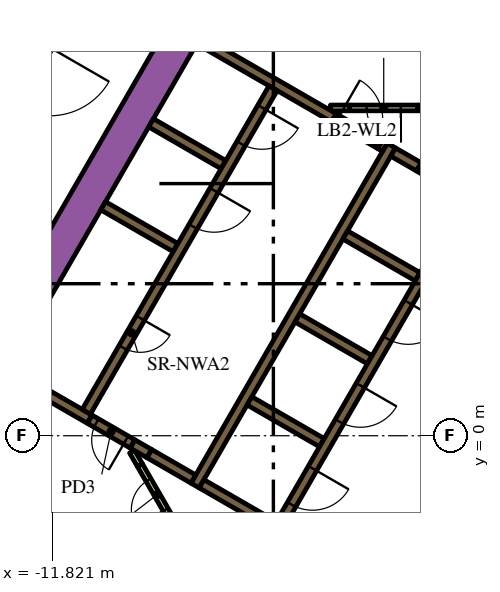
"""IFC4 building model, lengths in metres.
Left out: names, types, materials, properties, quantities, classifications, styles, units other than length and angle.
Written with IfcOpenShell. Run it as: python <this file> out.ifc"""

import sys

from ifc_helpers import new_model, si_unit, direction, frame, frame_2d, origin, place, context, subcontext, project, spatial, polyline, rectangle, outline, extrude, element, fill, save


model = new_model("IFC4")
c1 = context("Model", 3, precision=1e-05, world=origin(), true_north=direction((0.0, 1.0)))
c2 = subcontext(c1, "Body", "Model", "MODEL_VIEW")
j1 = project(units=[si_unit("LENGTHUNIT", "METRE"), si_unit("PLANEANGLEUNIT", "RADIAN")], contexts=[c1])
p1 = place(None, origin())
s1 = spatial("IfcSite", under=j1, at=p1, CompositionType="ELEMENT")
p2 = place(p1, origin())
s2 = spatial("IfcBuilding", under=s1, at=p2, CompositionType="ELEMENT")
p3 = place(p2, frame((0.0, 0.0, 134.4)))
s3 = spatial("IfcBuildingStorey", under=s2, at=p3, CompositionType="ELEMENT", Elevation=134.4)
p4 = place(p3, frame((-14.268, 0.387, 0.0), z_axis=(0.0, 0.0, 1.0), x_axis=(0.499994617707, 0.866028511231, 0.0)))
e1 = element("IfcWall", 1, at=p4, inside=s3, PredefinedType="SOLIDWALL", context=c2, shape_type="SweptSolid", body=[
    extrude(rectangle(XDim=18.817, YDim=0.9, at=frame_2d((9.409, 0.0))), origin(), (0.0, 0.0, 1.0), 7.2),
])
p5 = place(p3, frame((-8.06, -1.311, 0.0), z_axis=(0.0, 0.0, 1.0), x_axis=(0.50000273126, 0.866023826885, 0.0)))
e2 = element("IfcWall", 2, at=p5, inside=s3, PredefinedType="SOLIDWALL", context=c2, shape_type="SweptSolid", body=[
    extrude(rectangle(XDim=10.33, YDim=0.25, at=frame_2d((5.165, 0.0))), origin(), (0.0, 0.0, 1.0), 7.2),
])
p6 = place(p3, frame((-1.819, 6.87, 0.0), z_axis=(0.0, 0.0, 1.0), x_axis=(-0.866294599386, 0.499533449405, 0.0)))
e3 = element("IfcWall", 3, at=p6, inside=s3, PredefinedType="SOLIDWALL", context=c2, shape_type="SweptSolid", body=[
    extrude(rectangle(XDim=0.41, YDim=0.25, at=frame_2d((0.205, 0.0))), origin(), (0.0, 0.0, 1.0), 7.2),
])
p7 = place(p3, frame((-2.849, 7.465, 0.0), z_axis=(0.0, 0.0, 1.0), x_axis=(0.865955664968, -0.500120771724, 0.0)))
e4 = element("IfcWall", 4, at=p7, inside=s3, PredefinedType="SOLIDWALL", context=c2, shape_type="SweptSolid", body=[
    extrude(rectangle(XDim=0.778, YDim=0.25, at=frame_2d((0.389, 0.0))), origin(), (0.0, 0.0, 1.0), 7.2),
])
for number, where, z_axis, x_axis in (
    (5, (-2.204, 4.182, 0.0), (0.0, 0.0, 1.0), (-0.866, 0.5, 0.0)),
    (6, (-5.369, 3.1, 0.0), (0.0, 0.0, 1.0), (0.866, -0.5, 0.0)),
    (7, (-4.724, -0.182, 0.0), (0.0, 0.0, 1.0), (-0.866, 0.5, 0.0)),
):
    element("IfcWall", number, at=place(p3, frame(where, z_axis=z_axis, x_axis=x_axis)), inside=s3, PredefinedType="SOLIDWALL", context=c2, shape_type="SweptSolid", body=[
        extrude(rectangle(XDim=2.2, YDim=0.25, at=frame_2d((1.1, 0.0))), origin(), (0.0, 0.0, 1.0), 7.2),
    ])
p8 = place(p3, origin())
e8 = element("IfcWall", 8, at=p8, inside=s3, PredefinedType="SOLIDWALL", context=c2, shape_type="SweptSolid", body=[
    extrude(outline(polyline([(-5.922, -2.257), (-5.922, -2.257), (-5.705, -2.382), (-5.83, -2.598), (-6.418, -2.258), (-6.433, -2.153), (-6.433, -2.153), (-6.433, -2.153), (-6.508, -2.163), (-6.508, -2.163), (-6.508, -2.163), (-6.501, -2.21), (-7.952, -1.373), (-7.827, -1.156), (-5.922, -2.257)])), origin(), (0.0, 0.0, 1.0), 7.2),
])
p9 = place(p3, frame((-9.708, -0.215, 0.0), z_axis=(0.0, 0.0, 1.0), x_axis=(0.866113839764, -0.499846793097, 0.0)))
e9 = element("IfcWall", 9, at=p9, inside=s3, PredefinedType="SOLIDWALL", context=c2, shape_type="SweptSolid", body=[
    extrude(rectangle(XDim=0.51, YDim=0.25, at=frame_2d((0.255, 0.0))), origin(), (0.0, 0.0, 1.0), 7.2),
])
p10 = place(p3, frame((-12.999, 1.685, 0.0), z_axis=(0.0, 0.0, 1.0), x_axis=(0.865996765544, -0.500049599607, 0.0)))
e10 = element("IfcWall", 10, at=p10, inside=s3, PredefinedType="SOLIDWALL", context=c2, shape_type="SweptSolid", body=[
    extrude(rectangle(XDim=2.498, YDim=0.25, at=frame_2d((1.249, 0.0))), origin(), (0.0, 0.0, 1.0), 7.2),
])
p11 = place(p3, frame((-9.265, -0.471, 0.0), z_axis=(0.0, 0.0, 1.0), x_axis=(0.865954634268, -0.500122556369, 0.0)))
e11 = element("IfcWall", 11, at=p11, inside=s3, PredefinedType="SOLIDWALL", context=c2, shape_type="SweptSolid", body=[
    extrude(rectangle(XDim=1.338, YDim=0.25, at=frame_2d((0.669, 0.0))), origin(), (0.0, 0.0, 1.0), 7.2),
])
e12 = element("IfcWall", 12, at=p8, inside=s3, PredefinedType="SOLIDWALL", context=c2, shape_type="SweptSolid", body=[
    extrude(outline(polyline([(-3.128, 7.481), (-3.259, 7.557), (-3.134, 7.773), (-3.003, 7.698), (-3.128, 7.481)])), origin(), (0.0, 0.0, 1.0), 7.2),
])
for number, where, z_axis, x_axis in (
    (13, (-8.574, 4.95, 0.0), (0.0, 0.0, 1.0), (-0.866, 0.5, 0.0)),
    (14, (-7.314, 7.132, 0.0), (0.0, 0.0, 1.0), (-0.866, 0.5, 0.0)),
):
    element("IfcWall", number, at=place(p3, frame(where, z_axis=z_axis, x_axis=x_axis)), inside=s3, PredefinedType="SOLIDWALL", context=c2, shape_type="SweptSolid", body=[
        extrude(rectangle(XDim=2.2, YDim=0.25, at=frame_2d((1.1, 0.0))), origin(), (0.0, 0.0, 1.0), 7.2),
    ])
p12 = place(p3, frame((-7.959, 10.415, 0.0), z_axis=(0.0, 0.0, 1.0), x_axis=(0.866020958405, -0.500007699544, 0.0)))
e15 = element("IfcWall", 15, at=p12, inside=s3, PredefinedType="SOLIDWALL", context=c2, shape_type="SweptSolid", body=[
    extrude(rectangle(XDim=4.1, YDim=0.25, at=frame_2d((2.05, 0.0))), origin(), (0.0, 0.0, 1.0), 7.2),
])
p13 = place(p3, frame((-6.531, -2.689, 0.0), z_axis=(0.0, 0.0, 1.0), x_axis=(-0.499967446111, 0.866044197965, 0.0)))
e16 = element("IfcWall", 16, at=p13, inside=s3, PredefinedType="PARTITIONING", context=c2, shape_type="SweptSolid", body=[
    extrude(rectangle(XDim=0.748, YDim=0.15, at=frame_2d((0.374, 0.0))), origin(), (0.0, 0.0, 1.0), 6.15),
])
p14 = place(p3, frame((-9.512, -0.775, 0.0), z_axis=(0.0, 0.0, 1.0), x_axis=(-0.500080620599, 0.865978852456, 0.0)))
e17 = element("IfcWall", 17, at=p14, inside=s3, PredefinedType="PARTITIONING", context=c2, shape_type="SweptSolid", body=[
    extrude(rectangle(XDim=0.413, YDim=0.15, at=frame_2d((0.207, 0.0))), origin(), (0.0, 0.0, 1.0), 6.15),
])
p15 = place(p3, frame((-3.997, 8.625, 0.0), z_axis=(0.0, 0.0, 1.0), x_axis=(-1.0, 0.0, 0.0)))
e18 = element("IfcWall", 18, at=p15, inside=s3, PredefinedType="PARTITIONING", context=c2, shape_type="SweptSolid", body=[
    extrude(rectangle(XDim=0.502, YDim=0.15, at=frame_2d((0.251, 0.0))), origin(), (0.0, 0.0, 1.0), 6.15),
])
p16 = place(p3, frame((-2.196, 8.625, 0.0), z_axis=(0.0, 0.0, 1.0), x_axis=(1.0, 0.0, 0.0)))
e19 = element("IfcWall", 19, at=p16, inside=s3, PredefinedType="PARTITIONING", context=c2, shape_type="SweptSolid", body=[
    extrude(rectangle(XDim=1.146, YDim=0.15, at=frame_2d((0.573, 0.0))), origin(), (0.0, 0.0, 1.0), 6.15),
])
p17 = place(p3, frame((-6.008, 9.144, 0.0), z_axis=(0.0, 0.0, 1.0), x_axis=(-0.500006956611, -0.866021387346, 0.0)))
e20 = element("IfcWall", 20, at=p17, inside=s3, PredefinedType="SOLIDWALL", context=c2, shape_type="SweptSolid", body=[
    extrude(rectangle(XDim=9.83, YDim=0.25, at=frame_2d((4.915, 0.0))), origin(), (0.0, 0.0, 1.0), 7.2),
])
p18 = place(p17, frame((0.585, 0.0, 0.0)))
e21 = element("IfcOpeningElement", 21, at=p18, cuts=e20, PredefinedType="OPENING", context=c2, shape_type="SweptSolid", body=[
    extrude(rectangle(XDim=1.1, YDim=2.1, at=frame_2d((0.55, 1.05))), frame((0.0, 0.135, 0.0), z_axis=(0.0, -1.0, 0.0), x_axis=(1.0, 0.0, 0.0)), (0.0, 0.0, 1.0), 0.27),
])
p19 = place(p17, frame((3.105, 0.0, 0.0)))
e22 = element("IfcOpeningElement", 22, at=p19, cuts=e20, PredefinedType="OPENING", context=c2, shape_type="SweptSolid", body=[
    extrude(rectangle(XDim=1.1, YDim=2.1, at=frame_2d((0.55, 1.05))), frame((0.0, 0.135, 0.0), z_axis=(0.0, -1.0, 0.0), x_axis=(1.0, 0.0, 0.0)), (0.0, 0.0, 1.0), 0.27),
])
p20 = place(p17, frame((6.985, 0.0, 0.0)))
e23 = element("IfcOpeningElement", 23, at=p20, cuts=e20, PredefinedType="OPENING", context=c2, shape_type="SweptSolid", body=[
    extrude(rectangle(XDim=0.9, YDim=2.1, at=frame_2d((0.45, 1.05))), frame((0.0, 0.135, 0.0), z_axis=(0.0, -1.0, 0.0), x_axis=(1.0, 0.0, 0.0)), (0.0, 0.0, 1.0), 0.27),
])
p21 = place(p3, frame((-0.898, 6.194, 0.0), z_axis=(0.0, 0.0, 1.0), x_axis=(-0.499996202215, -0.866027596426, 0.0)))
e24 = element("IfcWall", 24, at=p21, inside=s3, PredefinedType="SOLIDWALL", context=c2, shape_type="SweptSolid", body=[
    extrude(rectangle(XDim=9.83, YDim=0.25, at=frame_2d((4.915, 0.0))), origin(), (0.0, 0.0, 1.0), 7.2),
])
p22 = place(p21, frame((0.585, 0.0, 0.0)))
e25 = element("IfcOpeningElement", 25, at=p22, cuts=e24, PredefinedType="OPENING", context=c2, shape_type="SweptSolid", body=[
    extrude(rectangle(XDim=1.1, YDim=2.1, at=frame_2d((0.55, 1.05))), frame((0.0, 0.135, 0.0), z_axis=(0.0, -1.0, 0.0), x_axis=(1.0, 0.0, 0.0)), (0.0, 0.0, 1.0), 0.27),
])
p23 = place(p21, frame((3.105, 0.0, 0.0)))
e26 = element("IfcOpeningElement", 26, at=p23, cuts=e24, PredefinedType="OPENING", context=c2, shape_type="SweptSolid", body=[
    extrude(rectangle(XDim=1.1, YDim=2.1, at=frame_2d((0.55, 1.05))), frame((0.0, 0.135, 0.0), z_axis=(0.0, -1.0, 0.0), x_axis=(1.0, 0.0, 0.0)), (0.0, 0.0, 1.0), 0.27),
])
p24 = place(p21, frame((5.625, 0.0, 0.0)))
e27 = element("IfcOpeningElement", 27, at=p24, cuts=e24, PredefinedType="OPENING", context=c2, shape_type="SweptSolid", body=[
    extrude(rectangle(XDim=1.1, YDim=2.1, at=frame_2d((0.55, 1.05))), frame((0.0, 0.135, 0.0), z_axis=(0.0, -1.0, 0.0), x_axis=(1.0, 0.0, 0.0)), (0.0, 0.0, 1.0), 0.27),
])
p25 = place(p21, frame((8.145, 0.0, 0.0)))
e28 = element("IfcOpeningElement", 28, at=p25, cuts=e24, PredefinedType="OPENING", context=c2, shape_type="SweptSolid", body=[
    extrude(rectangle(XDim=1.1, YDim=2.1, at=frame_2d((0.55, 1.05))), frame((0.0, 0.135, 0.0), z_axis=(0.0, -1.0, 0.0), x_axis=(1.0, 0.0, 0.0)), (0.0, 0.0, 1.0), 0.27),
])
p26 = place(p3, frame((-2.196, 8.625, 0.0), z_axis=(0.0, 0.0, 1.0), x_axis=(-1.0, 0.0, 0.0)))
e29 = element("IfcWall", 29, at=p26, inside=s3, PredefinedType="PARTITIONING", context=c2, shape_type="SweptSolid", body=[
    extrude(rectangle(XDim=1.8, YDim=0.15, at=frame_2d((0.9, 0.0))), origin(), (0.0, 0.0, 1.0), 6.15),
])
p27 = place(p26, frame((0.45, 0.0, 0.0)))
e30 = element("IfcOpeningElement", 30, at=p27, cuts=e29, PredefinedType="OPENING", context=c2, shape_type="SweptSolid", body=[
    extrude(rectangle(XDim=0.9, YDim=2.1, at=frame_2d((0.45, 1.05))), frame((0.0, 0.085, 0.0), z_axis=(0.0, -1.0, 0.0), x_axis=(1.0, 0.0, 0.0)), (0.0, 0.0, 1.0), 0.17),
])
p28 = place(p3, frame((-9.708, -0.215, 0.0), z_axis=(0.0, 0.0, 1.0), x_axis=(-0.866004217611, 0.500036693733, 0.0)))
e31 = element("IfcWall", 31, at=p28, inside=s3, PredefinedType="SOLIDWALL", context=c2, shape_type="SweptSolid", body=[
    extrude(rectangle(XDim=1.3, YDim=0.25, at=frame_2d((0.65, 0.0))), origin(), (0.0, 0.0, 1.0), 7.2),
])
p29 = place(p28, frame((0.2, 0.0, 0.0)))
e32 = element("IfcOpeningElement", 32, at=p29, cuts=e31, PredefinedType="OPENING", context=c2, shape_type="SweptSolid", body=[
    extrude(rectangle(XDim=0.9, YDim=2.1, at=frame_2d((0.45, 1.05))), frame((0.0, 0.135, 0.0), z_axis=(0.0, -1.0, 0.0), x_axis=(1.0, 0.0, 0.0)), (0.0, 0.0, 1.0), 0.27),
])
p30 = place(p3, frame((-4.409, 8.365, 0.0), z_axis=(0.0, 0.0, 1.0), x_axis=(0.866034573852, -0.49998411664, 0.0)))
e33 = element("IfcWall", 33, at=p30, inside=s3, PredefinedType="SOLIDWALL", context=c2, shape_type="SweptSolid", body=[
    extrude(rectangle(XDim=1.4, YDim=0.25, at=frame_2d((0.7, 0.0))), origin(), (0.0, 0.0, 1.0), 7.2),
])
p31 = place(p30, frame((0.1, 0.0, 0.0)))
e34 = element("IfcOpeningElement", 34, at=p31, cuts=e33, PredefinedType="OPENING", context=c2, shape_type="SweptSolid", body=[
    extrude(rectangle(XDim=1.2, YDim=2.1, at=frame_2d((0.6, 1.05))), frame((0.0, 0.135, 0.0), z_axis=(0.0, -1.0, 0.0), x_axis=(1.0, 0.0, 0.0)), (0.0, 0.0, 1.0), 0.27),
])
p32 = place(p3, frame((-8.612, -2.333, 0.0), z_axis=(0.0, 0.0, 1.0), x_axis=(-0.499961193289, 0.866047807691, 0.0)))
e35 = element("IfcWall", 35, at=p32, inside=s3, PredefinedType="PARTITIONING", context=c2, shape_type="SweptSolid", body=[
    extrude(rectangle(XDim=1.8, YDim=0.15, at=frame_2d((0.9, 0.0))), origin(), (0.0, 0.0, 1.0), 6.15),
])
p33 = place(p32, frame((0.45, 0.0, 0.0)))
e36 = element("IfcOpeningElement", 36, at=p33, cuts=e35, PredefinedType="OPENING", context=c2, shape_type="SweptSolid", body=[
    extrude(rectangle(XDim=0.9, YDim=2.1, at=frame_2d((0.45, 1.05))), frame((0.0, 0.085, 0.0), z_axis=(0.0, -1.0, 0.0), x_axis=(1.0, 0.0, 0.0)), (0.0, 0.0, 1.0), 0.17),
])
p34 = place(p3, frame((-6.639, 19.3, 0.0), z_axis=(0.0, 0.0, 1.0), x_axis=(-0.500001456469, -0.86602456289, 0.0)))
e37 = element("IfcWall", 37, at=p34, inside=s3, PredefinedType="PARTITIONING", context=c2, shape_type="SweptSolid", body=[
    extrude(rectangle(XDim=22.774, YDim=0.15, at=frame_2d((11.387, 0.0))), origin(), (0.0, 0.0, 1.0), 6.15),
])
p35 = place(p34, frame((10.487, 0.0, 0.0)))
e38 = element("IfcOpeningElement", 38, at=p35, cuts=e37, PredefinedType="OPENING", context=c2, shape_type="SweptSolid", body=[
    extrude(rectangle(XDim=1.8, YDim=2.1, at=frame_2d((0.9, 1.05))), frame((0.0, 0.085, 0.0), z_axis=(0.0, -1.0, 0.0), x_axis=(1.0, 0.0, 0.0)), (0.0, 0.0, 1.0), 0.17),
])
p36 = place(p34, frame((7.377, 0.0, 0.0)))
e39 = element("IfcOpeningElement", 39, at=p36, cuts=e37, PredefinedType="OPENING", context=c2, shape_type="SweptSolid", body=[
    extrude(rectangle(XDim=1.8, YDim=2.1, at=frame_2d((0.9, 1.05))), frame((0.0, 0.085, 0.0), z_axis=(0.0, -1.0, 0.0), x_axis=(1.0, 0.0, 0.0)), (0.0, 0.0, 1.0), 0.17),
])
p37 = place(p18, origin())
e40 = element("IfcDoor", 40, at=p37, inside=s3, OperationType="DOUBLE_DOOR_SLIDING", PredefinedType="DOOR", context=c2, shape_type="SweptSolid", body=[
    extrude(rectangle(XDim=1.1, YDim=2.1, at=frame_2d((0.55, 1.05))), frame((0.0, 0.025, 0.0), z_axis=(0.0, -1.0, 0.0), x_axis=(1.0, 0.0, 0.0)), (0.0, 0.0, 1.0), 0.05),
])
fill(e21, e40)
p38 = place(p19, origin())
e41 = element("IfcDoor", 41, at=p38, inside=s3, OperationType="DOUBLE_DOOR_SLIDING", PredefinedType="DOOR", context=c2, shape_type="SweptSolid", body=[
    extrude(rectangle(XDim=1.1, YDim=2.1, at=frame_2d((0.55, 1.05))), frame((0.0, 0.025, 0.0), z_axis=(0.0, -1.0, 0.0), x_axis=(1.0, 0.0, 0.0)), (0.0, 0.0, 1.0), 0.05),
])
fill(e22, e41)
p39 = place(p20, origin())
e42 = element("IfcDoor", 42, at=p39, inside=s3, OperationType="SINGLE_SWING_LEFT", PredefinedType="DOOR", context=c2, shape_type="SweptSolid", body=[
    extrude(rectangle(XDim=0.9, YDim=2.1, at=frame_2d((0.45, 1.05))), frame((0.0, 0.025, 0.0), z_axis=(0.0, -1.0, 0.0), x_axis=(1.0, 0.0, 0.0)), (0.0, 0.0, 1.0), 0.05),
])
fill(e23, e42)
p40 = place(p23, origin())
e43 = element("IfcDoor", 43, at=p40, inside=s3, OperationType="DOUBLE_DOOR_SLIDING", PredefinedType="DOOR", context=c2, shape_type="SweptSolid", body=[
    extrude(rectangle(XDim=1.1, YDim=2.1, at=frame_2d((0.55, 1.05))), frame((0.0, 0.025, 0.0), z_axis=(0.0, -1.0, 0.0), x_axis=(1.0, 0.0, 0.0)), (0.0, 0.0, 1.0), 0.05),
])
fill(e26, e43)
p41 = place(p24, origin())
e44 = element("IfcDoor", 44, at=p41, inside=s3, OperationType="DOUBLE_DOOR_SLIDING", PredefinedType="DOOR", context=c2, shape_type="SweptSolid", body=[
    extrude(rectangle(XDim=1.1, YDim=2.1, at=frame_2d((0.55, 1.05))), frame((0.0, 0.025, 0.0), z_axis=(0.0, -1.0, 0.0), x_axis=(1.0, 0.0, 0.0)), (0.0, 0.0, 1.0), 0.05),
])
fill(e27, e44)
p42 = place(p25, origin())
e45 = element("IfcDoor", 45, at=p42, inside=s3, OperationType="DOUBLE_DOOR_SLIDING", PredefinedType="DOOR", context=c2, shape_type="SweptSolid", body=[
    extrude(rectangle(XDim=1.1, YDim=2.1, at=frame_2d((0.55, 1.05))), frame((0.0, 0.025, 0.0), z_axis=(0.0, -1.0, 0.0), x_axis=(1.0, 0.0, 0.0)), (0.0, 0.0, 1.0), 0.05),
])
fill(e28, e45)
p43 = place(p27, origin())
e46 = element("IfcDoor", 46, at=p43, inside=s3, OperationType="SINGLE_SWING_LEFT", PredefinedType="DOOR", context=c2, shape_type="SweptSolid", body=[
    extrude(rectangle(XDim=0.9, YDim=2.1, at=frame_2d((0.45, 1.05))), frame((0.0, 0.025, 0.0), z_axis=(0.0, -1.0, 0.0), x_axis=(1.0, 0.0, 0.0)), (0.0, 0.0, 1.0), 0.05),
])
fill(e30, e46)
p44 = place(p29, origin())
e47 = element("IfcDoor", 47, at=p44, inside=s3, OperationType="SINGLE_SWING_LEFT", PredefinedType="DOOR", context=c2, shape_type="SweptSolid", body=[
    extrude(rectangle(XDim=0.9, YDim=2.1, at=frame_2d((0.45, 1.05))), frame((0.0, 0.025, 0.0), z_axis=(0.0, -1.0, 0.0), x_axis=(1.0, 0.0, 0.0)), (0.0, 0.0, 1.0), 0.05),
])
fill(e32, e47)
p45 = place(p31, origin())
e48 = element("IfcDoor", 48, at=p45, inside=s3, OperationType="SINGLE_SWING_LEFT", PredefinedType="DOOR", context=c2, shape_type="SweptSolid", body=[
    extrude(rectangle(XDim=1.2, YDim=2.1, at=frame_2d((0.6, 1.05))), frame((0.0, 0.025, 0.0), z_axis=(0.0, -1.0, 0.0), x_axis=(1.0, 0.0, 0.0)), (0.0, 0.0, 1.0), 0.05),
])
fill(e34, e48)
p46 = place(p33, origin())
e49 = element("IfcDoor", 49, at=p46, inside=s3, OperationType="SINGLE_SWING_LEFT", PredefinedType="DOOR", context=c2, shape_type="SweptSolid", body=[
    extrude(rectangle(XDim=0.9, YDim=2.1, at=frame_2d((0.45, 1.05))), frame((0.0, 0.025, 0.0), z_axis=(0.0, -1.0, 0.0), x_axis=(1.0, 0.0, 0.0)), (0.0, 0.0, 1.0), 0.05),
])
fill(e36, e49)
save(model, sys.argv[1])
